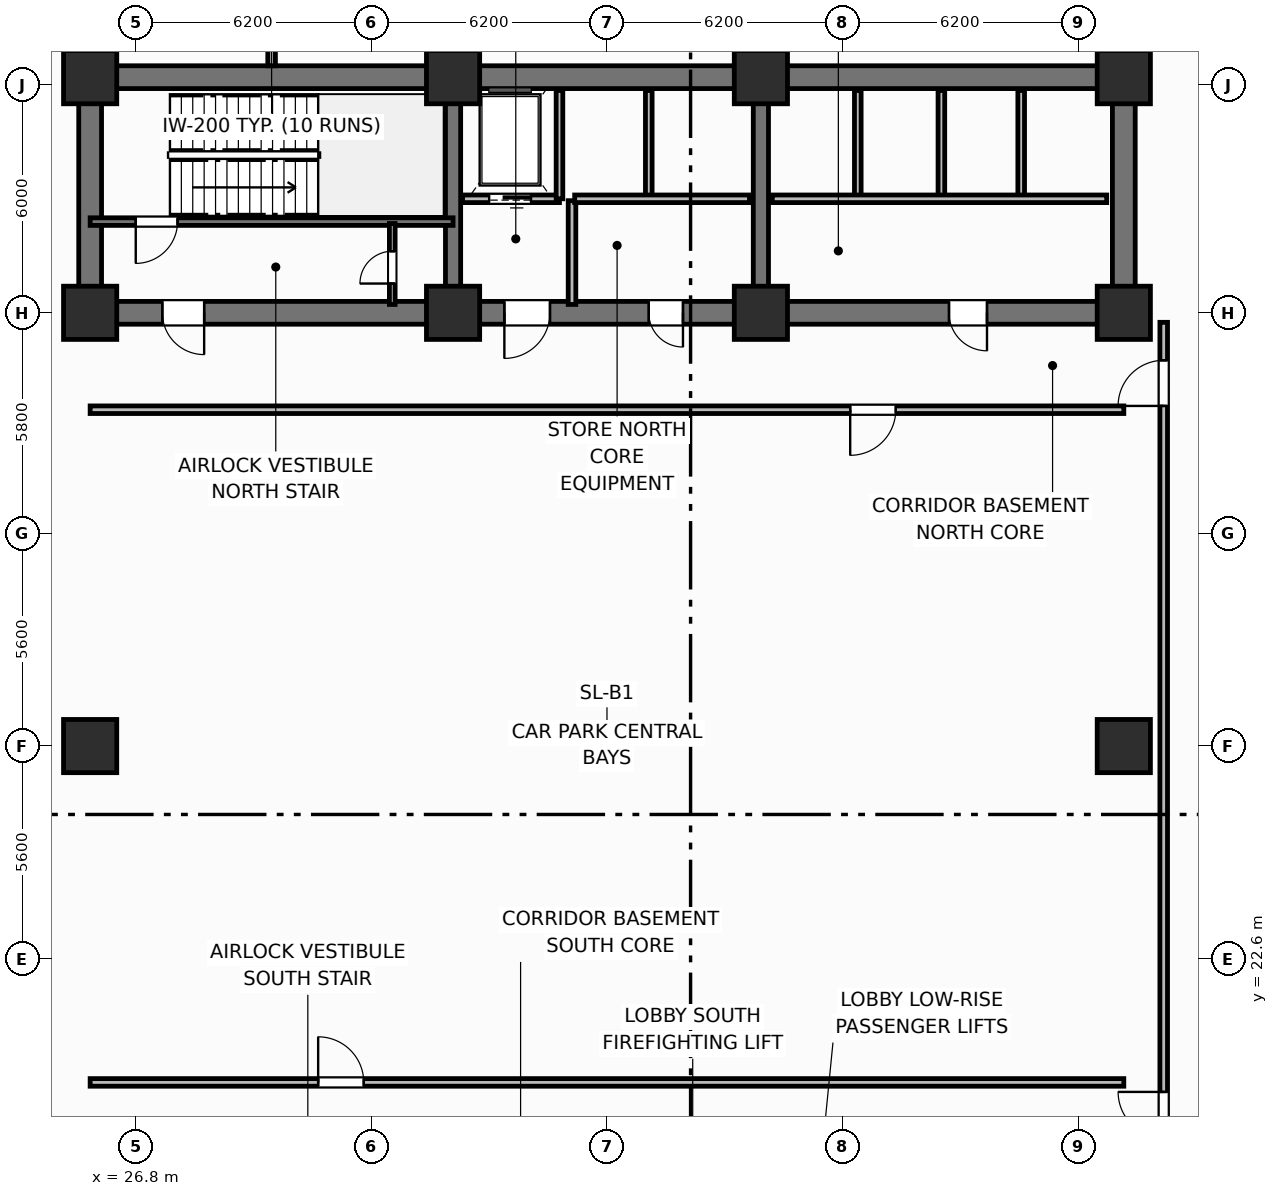
"""IFC4 building model, lengths in metres.
Left out: names, types, materials, properties, quantities, classifications, styles, units other than length and angle.
Written with IfcOpenShell. Run it as: python <this file> out.ifc"""

import sys

from ifc_helpers import new_model, si_unit, direction, frame, frame_2d, origin, origin_2d, place, context, subcontext, project, spatial, rectangle, extrude, element, fill, save


model = new_model("IFC4")
c1 = context("Model", 3, precision=1e-05, world=origin(), true_north=direction((0.0, 1.0)))
c2 = subcontext(c1, "Body", "Model", "MODEL_VIEW")
j1 = project(units=[si_unit("LENGTHUNIT", "METRE"), si_unit("PLANEANGLEUNIT", "RADIAN")], contexts=[c1])
p1 = place(None, origin())
s1 = spatial("IfcSite", under=j1, at=p1, CompositionType="ELEMENT")
p2 = place(p1, origin())
s2 = spatial("IfcBuilding", under=s1, at=p2, CompositionType="ELEMENT")
p3 = place(p2, frame((0.0, 0.0, -4.8)))
s3 = spatial("IfcBuildingStorey", under=s2, at=p3, CompositionType="ELEMENT", Elevation=-4.8)
p4 = place(p3, frame((25.6, 45.8, 0.0), z_axis=(0.0, 0.0, 1.0), x_axis=(1.0, 0.0, 0.0)))
e1 = element("IfcWall", 1, at=p4, inside=s3, PredefinedType="SHEAR", context=c2, shape_type="SweptSolid", body=[
    extrude(rectangle(XDim=27.2, YDim=0.6, at=frame_2d((13.6, 0.0))), origin(), (0.0, 0.0, 1.0), 4.8),
])
for number, where, z_axis, x_axis in (
    (2, (25.6, 39.9, 0.0), (0.0, 0.0, 1.0), (0.0, 1.0, 0.0)),
    (3, (52.8, 39.9, 0.0), (0.0, 0.0, 1.0), (0.0, 1.0, 0.0)),
):
    element("IfcWall", number, at=place(p3, frame(where, z_axis=z_axis, x_axis=x_axis)), inside=s3, PredefinedType="SHEAR", context=c2, shape_type="SweptSolid", body=[
        extrude(rectangle(XDim=5.6, YDim=0.6, at=frame_2d((2.8, 0.0))), origin(), (0.0, 0.0, 1.0), 4.8),
    ])
p5 = place(p3, frame((52.8, 39.6, 0.0), z_axis=(0.0, 0.0, 1.0), x_axis=(-1.0, 0.0, 0.0)))
e4 = element("IfcWall", 4, at=p5, inside=s3, PredefinedType="SHEAR", context=c2, shape_type="SweptSolid", body=[
    extrude(rectangle(XDim=27.2, YDim=0.6, at=frame_2d((13.6, 0.0))), origin(), (0.0, 0.0, 1.0), 4.8),
])
p6 = place(p5, frame((24.2, 0.0, 0.0)))
e5 = element("IfcOpeningElement", 5, at=p6, cuts=e4, PredefinedType="OPENING", context=c2, shape_type="SweptSolid", body=[
    extrude(rectangle(XDim=1.1, YDim=2.15, at=frame_2d((0.55, 1.075))), frame((0.0, 0.31, 0.0), z_axis=(0.0, -1.0, 0.0), x_axis=(1.0, 0.0, 0.0)), (0.0, 0.0, 1.0), 0.62),
])
p7 = place(p5, frame((15.1, 0.0, 0.0)))
e6 = element("IfcOpeningElement", 6, at=p7, cuts=e4, PredefinedType="OPENING", context=c2, shape_type="SweptSolid", body=[
    extrude(rectangle(XDim=1.2, YDim=2.15, at=frame_2d((0.6, 1.075))), frame((0.0, 0.31, 0.0), z_axis=(0.0, -1.0, 0.0), x_axis=(1.0, 0.0, 0.0)), (0.0, 0.0, 1.0), 0.62),
])
p8 = place(p5, frame((11.6, 0.0, 0.0)))
e7 = element("IfcOpeningElement", 7, at=p8, cuts=e4, PredefinedType="OPENING", context=c2, shape_type="SweptSolid", body=[
    extrude(rectangle(XDim=0.9, YDim=2.1, at=frame_2d((0.45, 1.05))), frame((0.0, 0.31, 0.0), z_axis=(0.0, -1.0, 0.0), x_axis=(1.0, 0.0, 0.0)), (0.0, 0.0, 1.0), 0.62),
])
p9 = place(p5, frame((3.6, 0.0, 0.0)))
e8 = element("IfcOpeningElement", 8, at=p9, cuts=e4, PredefinedType="OPENING", context=c2, shape_type="SweptSolid", body=[
    extrude(rectangle(XDim=1.0, YDim=2.15, at=frame_2d((0.5, 1.075))), frame((0.0, 0.31, 0.0), z_axis=(0.0, -1.0, 0.0), x_axis=(1.0, 0.0, 0.0)), (0.0, 0.0, 1.0), 0.62),
])
for number, where, z_axis, x_axis in (
    (9, (35.15, 39.9, 0.0), (0.0, 0.0, 1.0), (0.0, 1.0, 0.0)),
    (10, (43.25, 39.9, 0.0), (0.0, 0.0, 1.0), (0.0, 1.0, 0.0)),
):
    element("IfcWall", number, at=place(p3, frame(where, z_axis=z_axis, x_axis=x_axis)), inside=s3, PredefinedType="SHEAR", context=c2, shape_type="SweptSolid", body=[
        extrude(rectangle(XDim=5.6, YDim=0.4, at=frame_2d((2.8, 0.0))), origin(), (0.0, 0.0, 1.0), 4.8),
    ])
for number, where, z_axis, x_axis in (
    (11, (25.6, 39.6, 0.0), (0.0, 0.0, 1.0), (1.0, 0.0, 0.0)),
    (12, (25.6, 45.8, 0.0), (0.0, 0.0, 1.0), (1.0, 0.0, 0.0)),
    (13, (35.15, 39.6, 0.0), (0.0, 0.0, 1.0), (1.0, 0.0, 0.0)),
    (14, (35.15, 45.8, 0.0), (0.0, 0.0, 1.0), (1.0, 0.0, 0.0)),
    (15, (43.25, 39.6, 0.0), (0.0, 0.0, 1.0), (1.0, 0.0, 0.0)),
    (16, (43.25, 45.8, 0.0), (0.0, 0.0, 1.0), (1.0, 0.0, 0.0)),
    (17, (52.8, 39.6, 0.0), (0.0, 0.0, 1.0), (1.0, 0.0, 0.0)),
    (18, (52.8, 45.8, 0.0), (0.0, 0.0, 1.0), (1.0, 0.0, 0.0)),
    (19, (25.6, 28.2, 0.0), (0.0, 0.0, 1.0), (1.0, 0.0, 0.0)),
    (20, (52.8, 28.2, 0.0), (0.0, 0.0, 1.0), (1.0, 0.0, 0.0)),
):
    element("IfcColumn", number, at=place(p3, frame(where, z_axis=z_axis, x_axis=x_axis)), inside=s3, PredefinedType="COLUMN", context=c2, shape_type="SweptSolid", body=[
        extrude(rectangle(XDim=1.4, YDim=1.4, at=origin_2d()), origin(), (0.0, 0.0, 1.0), 4.8),
    ])
p10 = place(p3, frame((35.15, 42.0, 0.0), z_axis=(0.0, 0.0, 1.0), x_axis=(-1.0, 0.0, 0.0)))
e21 = element("IfcWall", 21, at=p10, inside=s3, PredefinedType="SHEAR", context=c2, shape_type="SweptSolid", body=[
    extrude(rectangle(XDim=9.55, YDim=0.2, at=frame_2d((4.775, 0.0))), origin(), (0.0, 0.0, 1.0), 4.8),
])
p11 = place(p10, frame((7.25, 0.0, 0.0)))
e22 = element("IfcOpeningElement", 22, at=p11, cuts=e21, PredefinedType="OPENING", context=c2, shape_type="SweptSolid", body=[
    extrude(rectangle(XDim=1.1, YDim=2.15, at=frame_2d((0.55, 1.075))), frame((0.0, 0.11, 0.0), z_axis=(0.0, -1.0, 0.0), x_axis=(1.0, 0.0, 0.0)), (0.0, 0.0, 1.0), 0.22),
])
p12 = place(p3, frame((33.55, 39.82, 0.0), z_axis=(0.0, 0.0, 1.0), x_axis=(0.0, 1.0, 0.0)))
e23 = element("IfcWall", 23, at=p12, inside=s3, PredefinedType="PARTITIONING", context=c2, shape_type="SweptSolid", body=[
    extrude(rectangle(XDim=2.13, YDim=0.15, at=frame_2d((1.065, 0.0))), origin(), (0.0, 0.0, 1.0), 3.67),
])
p13 = place(p12, frame((0.55, 0.0, 0.0)))
e24 = element("IfcOpeningElement", 24, at=p13, cuts=e23, PredefinedType="OPENING", context=c2, shape_type="SweptSolid", body=[
    extrude(rectangle(XDim=0.85, YDim=2.05, at=frame_2d((0.425, 1.025))), frame((0.0, 0.085, 0.0), z_axis=(0.0, -1.0, 0.0), x_axis=(1.0, 0.0, 0.0)), (0.0, 0.0, 1.0), 0.17),
])
p14 = place(p3, frame((37.95, 42.6, 0.0), z_axis=(0.0, 0.0, 1.0), x_axis=(-1.0, 0.0, 0.0)))
e25 = element("IfcWall", 25, at=p14, inside=s3, PredefinedType="PARTITIONING", context=c2, shape_type="SweptSolid", body=[
    extrude(rectangle(XDim=2.55, YDim=0.2, at=frame_2d((1.275, 0.0))), origin(), (0.0, 0.0, 1.0), 3.33),
])
p15 = place(p14, frame((0.75, 0.0, 0.0)))
e26 = element("IfcOpeningElement", 26, at=p15, cuts=e25, PredefinedType="OPENING", context=c2, shape_type="SweptSolid", body=[
    extrude(rectangle(XDim=1.1, YDim=2.15, at=frame_2d((0.55, 1.075))), frame((0.0, 0.11, 0.0), z_axis=(0.0, -1.0, 0.0), x_axis=(1.0, 0.0, 0.0)), (0.0, 0.0, 1.0), 0.22),
])
p16 = place(p3, frame((37.95, 42.6, 0.0), z_axis=(0.0, 0.0, 1.0), x_axis=(0.0, 1.0, 0.0)))
e27 = element("IfcWall", 27, at=p16, inside=s3, PredefinedType="PARTITIONING", context=c2, shape_type="SweptSolid", body=[
    extrude(rectangle(XDim=2.85, YDim=0.175, at=frame_2d((1.425, 0.0))), origin(), (0.0, 0.0, 1.0), 3.67),
])
p17 = place(p3, frame((38.28, 39.82, 0.0), z_axis=(0.0, 0.0, 1.0), x_axis=(0.0, 1.0, 0.0)))
e28 = element("IfcWall", 28, at=p17, inside=s3, PredefinedType="PARTITIONING", context=c2, shape_type="SweptSolid", body=[
    extrude(rectangle(XDim=2.73, YDim=0.2, at=frame_2d((1.365, 0.0))), origin(), (0.0, 0.0, 1.0), 3.67),
])
p18 = place(p3, frame((40.3, 42.65, 0.0), z_axis=(0.0, 0.0, 1.0), x_axis=(0.0, 1.0, 0.0)))
e29 = element("IfcWall", 29, at=p18, inside=s3, PredefinedType="PARTITIONING", context=c2, shape_type="SweptSolid", body=[
    extrude(rectangle(XDim=2.8, YDim=0.175, at=frame_2d((1.4, 0.0))), origin(), (0.0, 0.0, 1.0), 3.67),
])
p19 = place(p3, frame((42.95, 42.6, 0.0), z_axis=(0.0, 0.0, 1.0), x_axis=(-1.0, 0.0, 0.0)))
e30 = element("IfcWall", 30, at=p19, inside=s3, PredefinedType="PARTITIONING", context=c2, shape_type="SweptSolid", body=[
    extrude(rectangle(XDim=4.6, YDim=0.2, at=frame_2d((2.3, 0.0))), origin(), (0.0, 0.0, 1.0), 3.33),
])
for number, where, z_axis, x_axis in (
    (31, (45.8, 42.65, 0.0), (0.0, 0.0, 1.0), (0.0, 1.0, 0.0)),
    (32, (48.0, 42.65, 0.0), (0.0, 0.0, 1.0), (0.0, 1.0, 0.0)),
    (33, (50.1, 42.65, 0.0), (0.0, 0.0, 1.0), (0.0, 1.0, 0.0)),
):
    element("IfcWall", number, at=place(p3, frame(where, z_axis=z_axis, x_axis=x_axis)), inside=s3, PredefinedType="PARTITIONING", context=c2, shape_type="SweptSolid", body=[
        extrude(rectangle(XDim=2.8, YDim=0.175, at=frame_2d((1.4, 0.0))), origin(), (0.0, 0.0, 1.0), 3.67),
    ])
p20 = place(p3, frame((52.35, 42.6, 0.0), z_axis=(0.0, 0.0, 1.0), x_axis=(-1.0, 0.0, 0.0)))
e34 = element("IfcWall", 34, at=p20, inside=s3, PredefinedType="PARTITIONING", context=c2, shape_type="SweptSolid", body=[
    extrude(rectangle(XDim=8.8, YDim=0.2, at=frame_2d((4.4, 0.0))), origin(), (0.0, 0.0, 1.0), 3.67),
])
p21 = place(p3, frame((30.375, 46.1, 0.0), z_axis=(0.0, 0.0, 1.0), x_axis=(0.0, 1.0, 0.0)))
e35 = element("IfcWall", 35, at=p21, inside=s3, PredefinedType="PARTITIONING", context=c2, shape_type="SweptSolid", body=[
    extrude(rectangle(XDim=9.1, YDim=0.2, at=frame_2d((4.55, 0.0))), origin(), (0.0, 0.0, 1.0), 3.67),
])
p22 = place(p21, frame((2.25, 0.0, 0.0)))
e36 = element("IfcOpeningElement", 36, at=p22, cuts=e35, PredefinedType="OPENING", context=c2, shape_type="SweptSolid", body=[
    extrude(rectangle(XDim=4.6, YDim=2.9, at=frame_2d((2.3, 1.45))), frame((0.0, 0.11, 0.0), z_axis=(0.0, -1.0, 0.0), x_axis=(1.0, 0.0, 0.0)), (0.0, 0.0, 1.0), 0.22),
])
p23 = place(p3, frame((25.6, 19.35, 0.0), z_axis=(0.0, 0.0, 1.0), x_axis=(1.0, 0.0, 0.0)))
e37 = element("IfcWall", 37, at=p23, inside=s3, PredefinedType="PARTITIONING", context=c2, shape_type="SweptSolid", body=[
    extrude(rectangle(XDim=27.2, YDim=0.2, at=frame_2d((13.6, 0.0))), origin(), (0.0, 0.0, 1.0), 3.67),
])
p24 = place(p23, frame((6.0, 0.0, 0.0)))
e38 = element("IfcOpeningElement", 38, at=p24, cuts=e37, PredefinedType="OPENING", context=c2, shape_type="SweptSolid", body=[
    extrude(rectangle(XDim=1.2, YDim=2.15, at=frame_2d((0.6, 1.075))), frame((0.0, 0.11, 0.0), z_axis=(0.0, -1.0, 0.0), x_axis=(1.0, 0.0, 0.0)), (0.0, 0.0, 1.0), 0.22),
])
p25 = place(p3, frame((52.8, 37.05, 0.0), z_axis=(0.0, 0.0, 1.0), x_axis=(-1.0, 0.0, 0.0)))
e39 = element("IfcWall", 39, at=p25, inside=s3, PredefinedType="PARTITIONING", context=c2, shape_type="SweptSolid", body=[
    extrude(rectangle(XDim=27.2, YDim=0.2, at=frame_2d((13.6, 0.0))), origin(), (0.0, 0.0, 1.0), 3.67),
])
p26 = place(p25, frame((6.0, 0.0, 0.0)))
e40 = element("IfcOpeningElement", 40, at=p26, cuts=e39, PredefinedType="OPENING", context=c2, shape_type="SweptSolid", body=[
    extrude(rectangle(XDim=1.2, YDim=2.15, at=frame_2d((0.6, 1.075))), frame((0.0, 0.11, 0.0), z_axis=(0.0, -1.0, 0.0), x_axis=(1.0, 0.0, 0.0)), (0.0, 0.0, 1.0), 0.22),
])
p27 = place(p3, frame((53.85, 17.05, 0.0), z_axis=(0.0, 0.0, 1.0), x_axis=(0.0, 1.0, 0.0)))
e41 = element("IfcWall", 41, at=p27, inside=s3, PredefinedType="PARTITIONING", context=c2, shape_type="SweptSolid", body=[
    extrude(rectangle(XDim=22.3, YDim=0.2, at=frame_2d((11.15, 0.0))), origin(), (0.0, 0.0, 1.0), 3.67),
])
p28 = place(p27, frame((0.85, 0.0, 0.0)))
e42 = element("IfcOpeningElement", 42, at=p28, cuts=e41, PredefinedType="OPENING", context=c2, shape_type="SweptSolid", body=[
    extrude(rectangle(XDim=1.2, YDim=2.15, at=frame_2d((0.6, 1.075))), frame((0.0, 0.11, 0.0), z_axis=(0.0, -1.0, 0.0), x_axis=(1.0, 0.0, 0.0)), (0.0, 0.0, 1.0), 0.22),
])
p29 = place(p27, frame((20.1, 0.0, 0.0)))
e43 = element("IfcOpeningElement", 43, at=p29, cuts=e41, PredefinedType="OPENING", context=c2, shape_type="SweptSolid", body=[
    extrude(rectangle(XDim=1.2, YDim=2.15, at=frame_2d((0.6, 1.075))), frame((0.0, 0.11, 0.0), z_axis=(0.0, -1.0, 0.0), x_axis=(1.0, 0.0, 0.0)), (0.0, 0.0, 1.0), 0.22),
])
p30 = place(p11, origin())
e44 = element("IfcDoor", 44, at=p30, inside=s3, OperationType="SINGLE_SWING_RIGHT", PredefinedType="DOOR", context=c2, shape_type="SweptSolid", body=[
    extrude(rectangle(XDim=1.1, YDim=2.15, at=frame_2d((0.55, 1.075))), frame((0.0, 0.025, 0.0), z_axis=(0.0, -1.0, 0.0), x_axis=(1.0, 0.0, 0.0)), (0.0, 0.0, 1.0), 0.05),
])
fill(e22, e44)
p31 = place(p13, origin())
e45 = element("IfcDoor", 45, at=p31, inside=s3, OperationType="SINGLE_SWING_LEFT", PredefinedType="TRAPDOOR", context=c2, shape_type="SweptSolid", body=[
    extrude(rectangle(XDim=0.85, YDim=2.05, at=frame_2d((0.425, 1.025))), frame((0.0, 0.025, 0.0), z_axis=(0.0, -1.0, 0.0), x_axis=(1.0, 0.0, 0.0)), (0.0, 0.0, 1.0), 0.05),
])
fill(e24, e45)
p32 = place(p15, origin())
e46 = element("IfcDoor", 46, at=p32, inside=s3, OperationType="SLIDING_TO_LEFT", PredefinedType="DOOR", context=c2, shape_type="SweptSolid", body=[
    extrude(rectangle(XDim=1.1, YDim=2.15, at=frame_2d((0.55, 1.075))), frame((0.0, 0.025, 0.0), z_axis=(0.0, -1.0, 0.0), x_axis=(1.0, 0.0, 0.0)), (0.0, 0.0, 1.0), 0.05),
])
fill(e26, e46)
p33 = place(p24, origin())
e47 = element("IfcDoor", 47, at=p33, inside=s3, OperationType="SINGLE_SWING_LEFT", PredefinedType="DOOR", context=c2, shape_type="SweptSolid", body=[
    extrude(rectangle(XDim=1.2, YDim=2.15, at=frame_2d((0.6, 1.075))), frame((0.0, 0.025, 0.0), z_axis=(0.0, -1.0, 0.0), x_axis=(1.0, 0.0, 0.0)), (0.0, 0.0, 1.0), 0.05),
])
fill(e38, e47)
p34 = place(p26, origin())
e48 = element("IfcDoor", 48, at=p34, inside=s3, OperationType="SINGLE_SWING_RIGHT", PredefinedType="DOOR", context=c2, shape_type="SweptSolid", body=[
    extrude(rectangle(XDim=1.2, YDim=2.15, at=frame_2d((0.6, 1.075))), frame((0.0, 0.025, 0.0), z_axis=(0.0, -1.0, 0.0), x_axis=(1.0, 0.0, 0.0)), (0.0, 0.0, 1.0), 0.05),
])
fill(e40, e48)
p35 = place(p28, origin())
e49 = element("IfcDoor", 49, at=p35, inside=s3, OperationType="SINGLE_SWING_RIGHT", PredefinedType="DOOR", context=c2, shape_type="SweptSolid", body=[
    extrude(rectangle(XDim=1.2, YDim=2.15, at=frame_2d((0.6, 1.075))), frame((0.0, 0.025, 0.0), z_axis=(0.0, -1.0, 0.0), x_axis=(1.0, 0.0, 0.0)), (0.0, 0.0, 1.0), 0.05),
])
fill(e42, e49)
p36 = place(p29, origin())
e50 = element("IfcDoor", 50, at=p36, inside=s3, OperationType="SINGLE_SWING_LEFT", PredefinedType="DOOR", context=c2, shape_type="SweptSolid", body=[
    extrude(rectangle(XDim=1.2, YDim=2.15, at=frame_2d((0.6, 1.075))), frame((0.0, 0.025, 0.0), z_axis=(0.0, -1.0, 0.0), x_axis=(1.0, 0.0, 0.0)), (0.0, 0.0, 1.0), 0.05),
])
fill(e43, e50)
p37 = place(p6, origin())
e51 = element("IfcDoor", 51, at=p37, inside=s3, OperationType="SINGLE_SWING_LEFT", PredefinedType="DOOR", context=c2, shape_type="SweptSolid", body=[
    extrude(rectangle(XDim=1.1, YDim=2.15, at=frame_2d((0.55, 1.075))), frame((0.0, 0.025, 0.0), z_axis=(0.0, -1.0, 0.0), x_axis=(1.0, 0.0, 0.0)), (0.0, 0.0, 1.0), 0.05),
])
fill(e5, e51)
p38 = place(p7, origin())
e52 = element("IfcDoor", 52, at=p38, inside=s3, OperationType="SINGLE_SWING_RIGHT", PredefinedType="DOOR", context=c2, shape_type="SweptSolid", body=[
    extrude(rectangle(XDim=1.2, YDim=2.15, at=frame_2d((0.6, 1.075))), frame((0.0, 0.025, 0.0), z_axis=(0.0, -1.0, 0.0), x_axis=(1.0, 0.0, 0.0)), (0.0, 0.0, 1.0), 0.05),
])
fill(e6, e52)
p39 = place(p8, origin())
e53 = element("IfcDoor", 53, at=p39, inside=s3, OperationType="SINGLE_SWING_LEFT", PredefinedType="DOOR", context=c2, shape_type="SweptSolid", body=[
    extrude(rectangle(XDim=0.9, YDim=2.1, at=frame_2d((0.45, 1.05))), frame((0.0, 0.025, 0.0), z_axis=(0.0, -1.0, 0.0), x_axis=(1.0, 0.0, 0.0)), (0.0, 0.0, 1.0), 0.05),
])
fill(e7, e53)
p40 = place(p9, origin())
e54 = element("IfcDoor", 54, at=p40, inside=s3, OperationType="SINGLE_SWING_LEFT", PredefinedType="DOOR", context=c2, shape_type="SweptSolid", body=[
    extrude(rectangle(XDim=1.0, YDim=2.15, at=frame_2d((0.5, 1.075))), frame((0.0, 0.025, 0.0), z_axis=(0.0, -1.0, 0.0), x_axis=(1.0, 0.0, 0.0)), (0.0, 0.0, 1.0), 0.05),
])
fill(e8, e54)
save(model, sys.argv[1])
